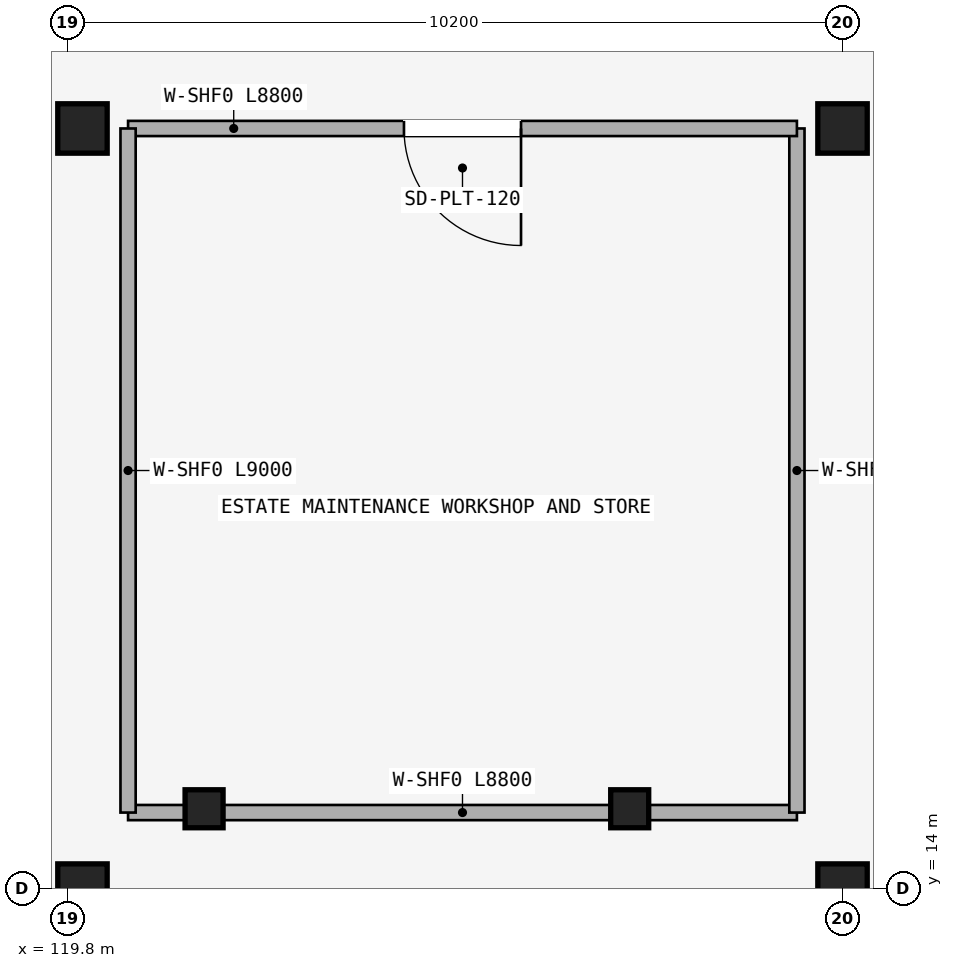
"""IFC4 building model, lengths in metres.
Left out: names, types, materials, properties, quantities, classifications, styles, units other than length and angle.
Written with IfcOpenShell. Run it as: python <this file> out.ifc"""

import sys

from ifc_helpers import new_model, si_unit, direction, frame, frame_2d, origin, origin_2d, place, context, subcontext, project, spatial, rectangle, extrude, element, fill, save


model = new_model("IFC4")
c1 = context("Model", 3, precision=1e-05, world=origin(), true_north=direction((0.0, 1.0)))
c2 = subcontext(c1, "Body", "Model", "MODEL_VIEW")
j1 = project(units=[si_unit("LENGTHUNIT", "METRE"), si_unit("PLANEANGLEUNIT", "RADIAN")], contexts=[c1])
p1 = place(None, origin())
s1 = spatial("IfcSite", under=j1, at=p1, CompositionType="ELEMENT")
p2 = place(p1, origin())
s2 = spatial("IfcBuilding", under=s1, at=p2, CompositionType="ELEMENT")
p3 = place(p2, frame((0.0, 0.0, -4.5)))
s3 = spatial("IfcBuildingStorey", under=s2, at=p3, CompositionType="ELEMENT", Elevation=-4.5)
for number, where, z_axis, x_axis in (
    (1, (120.0, 14.0, 0.0), (0.0, 0.0, 1.0), (1.0, 0.0, 0.0)),
    (2, (130.0, 14.0, 0.0), (0.0, 0.0, 1.0), (1.0, 0.0, 0.0)),
    (3, (120.0, 24.0, 0.0), (0.0, 0.0, 1.0), (1.0, 0.0, 0.0)),
    (4, (130.0, 24.0, 0.0), (0.0, 0.0, 1.0), (1.0, 0.0, 0.0)),
):
    element("IfcColumn", number, at=place(p3, frame(where, z_axis=z_axis, x_axis=x_axis)), inside=s3, PredefinedType="COLUMN", context=c2, shape_type="SweptSolid", body=[
        extrude(rectangle(XDim=0.65, YDim=0.65, at=origin_2d()), origin(), (0.0, 0.0, 1.0), 4.2),
    ])
for number, where, z_axis, x_axis in (
    (5, (121.6, 15.05, -0.5), (0.0, 0.0, 1.0), (1.0, 0.0, 0.0)),
    (6, (127.2, 15.05, -0.5), (0.0, 0.0, 1.0), (1.0, 0.0, 0.0)),
):
    element("IfcColumn", number, at=place(p3, frame(where, z_axis=z_axis, x_axis=x_axis)), inside=s3, PredefinedType="COLUMN", context=c2, shape_type="SweptSolid", body=[
        extrude(rectangle(XDim=0.5, YDim=0.5, at=origin_2d()), origin(), (0.0, 0.0, 1.0), 4.7),
    ])
p4 = place(p3, frame((120.6, 15.0, 0.0), z_axis=(0.0, 0.0, 1.0), x_axis=(1.0, 0.0, 0.0)))
e7 = element("IfcWall", 7, at=p4, inside=s3, PredefinedType="STANDARD", context=c2, shape_type="SweptSolid", body=[
    extrude(rectangle(XDim=8.8, YDim=0.2, at=frame_2d((4.4, 0.0))), origin(), (0.0, 0.0, 1.0), 4.18),
])
p5 = place(p3, frame((129.4, 15.0, 0.0), z_axis=(0.0, 0.0, 1.0), x_axis=(0.0, 1.0, 0.0)))
e8 = element("IfcWall", 8, at=p5, inside=s3, PredefinedType="STANDARD", context=c2, shape_type="SweptSolid", body=[
    extrude(rectangle(XDim=9.0, YDim=0.2, at=frame_2d((4.5, 0.0))), origin(), (0.0, 0.0, 1.0), 3.492),
])
p6 = place(p3, frame((129.4, 24.0, 0.0), z_axis=(0.0, 0.0, 1.0), x_axis=(-1.0, 0.0, 0.0)))
e9 = element("IfcWall", 9, at=p6, inside=s3, PredefinedType="STANDARD", context=c2, shape_type="SweptSolid", body=[
    extrude(rectangle(XDim=8.8, YDim=0.2, at=frame_2d((4.4, 0.0))), origin(), (0.0, 0.0, 1.0), 3.492),
])
p7 = place(p6, frame((3.63, 0.0, 0.0)))
e10 = element("IfcOpeningElement", 10, at=p7, cuts=e9, PredefinedType="OPENING", context=c2, shape_type="SweptSolid", body=[
    extrude(rectangle(XDim=1.54, YDim=2.15, at=frame_2d((0.77, 1.075))), frame((0.0, 0.11, 0.0), z_axis=(0.0, -1.0, 0.0), x_axis=(1.0, 0.0, 0.0)), (0.0, 0.0, 1.0), 0.22),
])
p8 = place(p3, frame((120.6, 24.0, 0.0), z_axis=(0.0, 0.0, 1.0), x_axis=(0.0, -1.0, 0.0)))
e11 = element("IfcWall", 11, at=p8, inside=s3, PredefinedType="STANDARD", context=c2, shape_type="SweptSolid", body=[
    extrude(rectangle(XDim=9.0, YDim=0.2, at=frame_2d((4.5, 0.0))), origin(), (0.0, 0.0, 1.0), 3.492),
])
p9 = place(p7, frame((1.54, 0.0, 0.0), z_axis=(0.0, 0.0, 1.0), x_axis=(-1.0, 0.0, 0.0)))
e12 = element("IfcDoor", 12, at=p9, inside=s3, OperationType="SINGLE_SWING_RIGHT", PredefinedType="DOOR", context=c2, shape_type="SweptSolid", body=[
    extrude(rectangle(XDim=1.54, YDim=2.15, at=frame_2d((0.77, 1.075))), frame((0.0, 0.025, 0.0), z_axis=(0.0, -1.0, 0.0), x_axis=(1.0, 0.0, 0.0)), (0.0, 0.0, 1.0), 0.05),
])
fill(e10, e12)
save(model, sys.argv[1])
